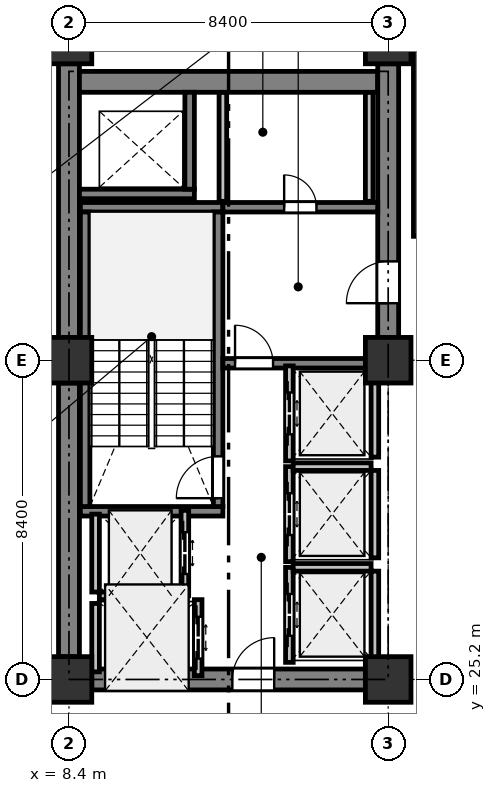
"""IFC4 building model, lengths in metres.
Left out: names, types, materials, properties, quantities, classifications, styles, units other than length and angle.
Written with IfcOpenShell. Run it as: python <this file> out.ifc"""

import sys

from ifc_helpers import new_model, si_unit, direction, frame, frame_2d, origin, origin_2d, place, context, subcontext, project, spatial, rectangle, extrude, element, fill, save


model = new_model("IFC4")
c1 = context("Model", 3, precision=1e-05, world=origin(), true_north=direction((0.0, 1.0)))
c2 = subcontext(c1, "Body", "Model", "MODEL_VIEW")
j1 = project(units=[si_unit("LENGTHUNIT", "METRE"), si_unit("PLANEANGLEUNIT", "RADIAN")], contexts=[c1])
p1 = place(None, origin())
s1 = spatial("IfcSite", under=j1, at=p1, CompositionType="ELEMENT")
p2 = place(p1, origin())
s2 = spatial("IfcBuilding", under=s1, at=p2, CompositionType="ELEMENT")
p3 = place(p2, frame((0.0, 0.0, 113.1)))
s3 = spatial("IfcBuildingStorey", under=s2, at=p3, CompositionType="ELEMENT", Elevation=113.1)
for number, where, z_axis, x_axis in (
    (1, (8.4, 25.2, 0.0), (0.0, 0.0, 1.0), (1.0, 0.0, 0.0)),
    (2, (8.4, 33.6, 0.0), (0.0, 0.0, 1.0), (1.0, 0.0, 0.0)),
    (3, (8.4, 42.0, 0.0), (0.0, 0.0, 1.0), (1.0, 0.0, 0.0)),
    (4, (16.8, 25.2, 0.0), (0.0, 0.0, 1.0), (1.0, 0.0, 0.0)),
    (5, (16.8, 33.6, 0.0), (0.0, 0.0, 1.0), (1.0, 0.0, 0.0)),
    (6, (16.8, 42.0, 0.0), (0.0, 0.0, 1.0), (1.0, 0.0, 0.0)),
):
    element("IfcColumn", number, at=place(p3, frame(where, z_axis=z_axis, x_axis=x_axis)), inside=s3, PredefinedType="COLUMN", context=c2, shape_type="SweptSolid", body=[
        extrude(rectangle(XDim=1.2, YDim=1.2, at=origin_2d()), origin(), (0.0, 0.0, 1.0), 4.1),
    ])
for number, where, z_axis, x_axis in (
    (7, (8.4, 25.8, 0.0), (0.0, 0.0, 1.0), (0.0, 1.0, 0.0)),
    (8, (8.4, 34.2, 0.0), (0.0, 0.0, 1.0), (0.0, 1.0, 0.0)),
):
    element("IfcWall", number, at=place(p3, frame(where, z_axis=z_axis, x_axis=x_axis)), inside=s3, PredefinedType="SHEAR", context=c2, shape_type="SweptSolid", body=[
        extrude(rectangle(XDim=7.2, YDim=0.55, at=frame_2d((3.6, 0.0))), origin(), (0.0, 0.0, 1.0), 3.825),
    ])
p4 = place(p3, frame((8.675, 40.925, 0.0), z_axis=(0.0, 0.0, 1.0), x_axis=(1.0, 0.0, 0.0)))
e9 = element("IfcWall", 9, at=p4, inside=s3, PredefinedType="SHEAR", context=c2, shape_type="SweptSolid", body=[
    extrude(rectangle(XDim=7.85, YDim=0.55, at=frame_2d((3.925, 0.0))), origin(), (0.0, 0.0, 1.0), 3.825),
])
p5 = place(p3, frame((16.8, 34.2, 0.0), z_axis=(0.0, 0.0, 1.0), x_axis=(0.0, 1.0, 0.0)))
e10 = element("IfcWall", 10, at=p5, inside=s3, PredefinedType="SHEAR", context=c2, shape_type="SweptSolid", body=[
    extrude(rectangle(XDim=7.2, YDim=0.55, at=frame_2d((3.6, 0.0))), origin(), (0.0, 0.0, 1.0), 3.825),
])
p6 = place(p5, frame((0.9, 0.0, 0.0)))
e11 = element("IfcOpeningElement", 11, at=p6, cuts=e10, PredefinedType="OPENING", context=c2, shape_type="SweptSolid", body=[
    extrude(rectangle(XDim=1.1, YDim=2.15, at=frame_2d((0.55, 1.075))), frame((0.0, 0.285, 0.0), z_axis=(0.0, -1.0, 0.0), x_axis=(1.0, 0.0, 0.0)), (0.0, 0.0, 1.0), 0.57),
])
p7 = place(p3, frame((9.0, 25.2, 0.0), z_axis=(0.0, 0.0, 1.0), x_axis=(1.0, 0.0, 0.0)))
e12 = element("IfcWall", 12, at=p7, inside=s3, PredefinedType="SHEAR", context=c2, shape_type="SweptSolid", body=[
    extrude(rectangle(XDim=7.2, YDim=0.55, at=frame_2d((3.6, 0.0))), origin(), (0.0, 0.0, 1.0), 3.825),
])
p8 = place(p7, frame((3.7, 0.0, 0.0)))
e13 = element("IfcOpeningElement", 13, at=p8, cuts=e12, PredefinedType="OPENING", context=c2, shape_type="SweptSolid", body=[
    extrude(rectangle(XDim=1.1, YDim=2.15, at=frame_2d((0.55, 1.075))), frame((0.0, 0.285, 0.0), z_axis=(0.0, -1.0, 0.0), x_axis=(1.0, 0.0, 0.0)), (0.0, 0.0, 1.0), 0.57),
])
for number, where, z_axis, x_axis in (
    (14, (12.45, 29.625, 0.0), (0.0, 0.0, 1.0), (-1.0, 0.0, 0.0)),
    (15, (12.45, 37.625, 0.0), (0.0, 0.0, 1.0), (-1.0, 0.0, 0.0)),
):
    element("IfcWall", number, at=place(p3, frame(where, z_axis=z_axis, x_axis=x_axis)), inside=s3, PredefinedType="SHEAR", context=c2, shape_type="SweptSolid", body=[
        extrude(rectangle(XDim=3.75, YDim=0.25, at=frame_2d((1.875, 0.0))), origin(), (0.0, 0.0, 1.0), 3.825),
    ])
p9 = place(p3, frame((12.325, 29.75, 0.0), z_axis=(0.0, 0.0, 1.0), x_axis=(0.0, 1.0, 0.0)))
e16 = element("IfcWall", 16, at=p9, inside=s3, PredefinedType="SHEAR", context=c2, shape_type="SweptSolid", body=[
    extrude(rectangle(XDim=7.75, YDim=0.25, at=frame_2d((3.875, 0.0))), origin(), (0.0, 0.0, 1.0), 3.825),
])
p10 = place(p9, frame((0.22, 0.0, 0.0)))
e17 = element("IfcOpeningElement", 17, at=p10, cuts=e16, PredefinedType="OPENING", context=c2, shape_type="SweptSolid", body=[
    extrude(rectangle(XDim=1.1, YDim=2.15, at=frame_2d((0.55, 1.075))), frame((0.0, 0.135, 0.0), z_axis=(0.0, -1.0, 0.0), x_axis=(1.0, 0.0, 0.0)), (0.0, 0.0, 1.0), 0.27),
])
p11 = place(p3, frame((8.825, 29.75, 0.0), z_axis=(0.0, 0.0, 1.0), x_axis=(0.0, 1.0, 0.0)))
e18 = element("IfcWall", 18, at=p11, inside=s3, PredefinedType="SHEAR", context=c2, shape_type="SweptSolid", body=[
    extrude(rectangle(XDim=7.75, YDim=0.25, at=frame_2d((3.875, 0.0))), origin(), (0.0, 0.0, 1.0), 3.825),
])
p12 = place(p3, frame((8.675, 37.975, 0.0), z_axis=(0.0, 0.0, 1.0), x_axis=(1.0, 0.0, 0.0)))
e19 = element("IfcWall", 19, at=p12, inside=s3, PredefinedType="SHEAR", context=c2, shape_type="SweptSolid", body=[
    extrude(rectangle(XDim=3.025, YDim=0.25, at=frame_2d((1.512, 0.0))), origin(), (0.0, 0.0, 1.0), 3.825),
])
p13 = place(p3, frame((11.575, 38.1, 0.0), z_axis=(0.0, 0.0, 1.0), x_axis=(0.0, 1.0, 0.0)))
e20 = element("IfcWall", 20, at=p13, inside=s3, PredefinedType="SHEAR", context=c2, shape_type="SweptSolid", body=[
    extrude(rectangle(XDim=2.55, YDim=0.25, at=frame_2d((1.275, 0.0))), origin(), (0.0, 0.0, 1.0), 3.825),
])
p14 = place(p3, frame((12.45, 33.52, 0.0), z_axis=(0.0, 0.0, 1.0), x_axis=(1.0, 0.0, 0.0)))
e21 = element("IfcWall", 21, at=p14, inside=s3, PredefinedType="SHEAR", context=c2, shape_type="SweptSolid", body=[
    extrude(rectangle(XDim=3.75, YDim=0.25, at=frame_2d((1.875, 0.0))), origin(), (0.0, 0.0, 1.0), 3.825),
])
p15 = place(p14, frame((0.32, 0.0, 0.0)))
e22 = element("IfcOpeningElement", 22, at=p15, cuts=e21, PredefinedType="OPENING", context=c2, shape_type="SweptSolid", body=[
    extrude(rectangle(XDim=1.0, YDim=2.15, at=frame_2d((0.5, 1.075))), frame((0.0, 0.135, 0.0), z_axis=(0.0, -1.0, 0.0), x_axis=(1.0, 0.0, 0.0)), (0.0, 0.0, 1.0), 0.27),
])
p16 = place(p3, frame((12.45, 37.625, 0.0), z_axis=(0.0, 0.0, 1.0), x_axis=(1.0, 0.0, 0.0)))
e23 = element("IfcWall", 23, at=p16, inside=s3, PredefinedType="SHEAR", context=c2, shape_type="SweptSolid", body=[
    extrude(rectangle(XDim=4.075, YDim=0.25, at=frame_2d((2.038, 0.0))), origin(), (0.0, 0.0, 1.0), 3.825),
])
p17 = place(p16, frame((1.613, 0.0, 0.0)))
e24 = element("IfcOpeningElement", 24, at=p17, cuts=e23, PredefinedType="OPENING", context=c2, shape_type="SweptSolid", body=[
    extrude(rectangle(XDim=0.85, YDim=2.15, at=frame_2d((0.425, 1.075))), frame((0.0, 0.135, 0.0), z_axis=(0.0, -1.0, 0.0), x_axis=(1.0, 0.0, 0.0)), (0.0, 0.0, 1.0), 0.27),
])
p18 = place(p3, frame((11.45, 27.4, 0.0), z_axis=(0.0, 0.0, 1.0), x_axis=(0.0, 1.0, 0.0)))
e25 = element("IfcWall", 25, at=p18, inside=s3, PredefinedType="PARTITIONING", context=c2, shape_type="SweptSolid", body=[
    extrude(rectangle(XDim=2.25, YDim=0.2, at=frame_2d((1.125, 0.0))), origin(), (0.0, 0.0, 1.0), 3.825),
])
p19 = place(p18, frame((0.575, 0.0, 0.0)))
e26 = element("IfcOpeningElement", 26, at=p19, cuts=e25, PredefinedType="OPENING", context=c2, shape_type="SweptSolid", body=[
    extrude(rectangle(XDim=1.1, YDim=2.2, at=frame_2d((0.55, 1.1))), frame((0.0, 0.11, 0.0), z_axis=(0.0, -1.0, 0.0), x_axis=(1.0, 0.0, 0.0)), (0.0, 0.0, 1.0), 0.22),
])
p20 = place(p3, frame((9.1, 27.5, 0.0), z_axis=(0.0, 0.0, 1.0), x_axis=(0.0, 1.0, 0.0)))
e27 = element("IfcWall", 27, at=p20, inside=s3, PredefinedType="PARTITIONING", context=c2, shape_type="SweptSolid", body=[
    extrude(rectangle(XDim=2.05, YDim=0.2, at=frame_2d((1.025, 0.0))), origin(), (0.0, 0.0, 1.0), 3.825),
])
p21 = place(p3, frame((9.2, 27.4, 0.0), z_axis=(0.0, 0.0, 1.0), x_axis=(1.0, 0.0, 0.0)))
e28 = element("IfcWall", 28, at=p21, inside=s3, PredefinedType="PARTITIONING", context=c2, shape_type="SweptSolid", body=[
    extrude(rectangle(XDim=2.15, YDim=0.2, at=frame_2d((1.075, 0.0))), origin(), (0.0, 0.0, 1.0), 3.825),
])
p22 = place(p3, frame((11.8, 25.3, 0.0), z_axis=(0.0, 0.0, 1.0), x_axis=(0.0, 1.0, 0.0)))
e29 = element("IfcWall", 29, at=p22, inside=s3, PredefinedType="PARTITIONING", context=c2, shape_type="SweptSolid", body=[
    extrude(rectangle(XDim=2.0, YDim=0.2, at=frame_2d((1.0, 0.0))), origin(), (0.0, 0.0, 1.0), 3.825),
])
p23 = place(p22, frame((0.45, 0.0, 0.0)))
e30 = element("IfcOpeningElement", 30, at=p23, cuts=e29, PredefinedType="OPENING", context=c2, shape_type="SweptSolid", body=[
    extrude(rectangle(XDim=1.1, YDim=2.2, at=frame_2d((0.55, 1.1))), frame((0.0, 0.11, 0.0), z_axis=(0.0, -1.0, 0.0), x_axis=(1.0, 0.0, 0.0)), (0.0, 0.0, 1.0), 0.22),
])
p24 = place(p3, frame((9.1, 25.4, 0.0), z_axis=(0.0, 0.0, 1.0), x_axis=(0.0, 1.0, 0.0)))
e31 = element("IfcWall", 31, at=p24, inside=s3, PredefinedType="PARTITIONING", context=c2, shape_type="SweptSolid", body=[
    extrude(rectangle(XDim=1.8, YDim=0.2, at=frame_2d((0.9, 0.0))), origin(), (0.0, 0.0, 1.0), 3.825),
])
p25 = place(p3, frame((14.2, 25.65, 0.0), z_axis=(0.0, 0.0, 1.0), x_axis=(0.0, 1.0, 0.0)))
e32 = element("IfcWall", 32, at=p25, inside=s3, PredefinedType="PARTITIONING", context=c2, shape_type="SweptSolid", body=[
    extrude(rectangle(XDim=2.5, YDim=0.2, at=frame_2d((1.25, 0.0))), origin(), (0.0, 0.0, 1.0), 3.825),
])
p26 = place(p25, frame((0.7, 0.0, 0.0)))
e33 = element("IfcOpeningElement", 33, at=p26, cuts=e32, PredefinedType="OPENING", context=c2, shape_type="SweptSolid", body=[
    extrude(rectangle(XDim=1.1, YDim=2.2, at=frame_2d((0.55, 1.1))), frame((0.0, 0.11, 0.0), z_axis=(0.0, -1.0, 0.0), x_axis=(1.0, 0.0, 0.0)), (0.0, 0.0, 1.0), 0.22),
])
p27 = place(p3, frame((16.45, 25.75, 0.0), z_axis=(0.0, 0.0, 1.0), x_axis=(0.0, 1.0, 0.0)))
e34 = element("IfcWall", 34, at=p27, inside=s3, PredefinedType="PARTITIONING", context=c2, shape_type="SweptSolid", body=[
    extrude(rectangle(XDim=2.3, YDim=0.2, at=frame_2d((1.15, 0.0))), origin(), (0.0, 0.0, 1.0), 3.825),
])
p28 = place(p3, frame((14.3, 28.15, 0.0), z_axis=(0.0, 0.0, 1.0), x_axis=(1.0, 0.0, 0.0)))
e35 = element("IfcWall", 35, at=p28, inside=s3, PredefinedType="PARTITIONING", context=c2, shape_type="SweptSolid", body=[
    extrude(rectangle(XDim=2.05, YDim=0.2, at=frame_2d((1.025, 0.0))), origin(), (0.0, 0.0, 1.0), 3.825),
])
p29 = place(p3, frame((14.2, 28.3, 0.0), z_axis=(0.0, 0.0, 1.0), x_axis=(0.0, 1.0, 0.0)))
e36 = element("IfcWall", 36, at=p29, inside=s3, PredefinedType="PARTITIONING", context=c2, shape_type="SweptSolid", body=[
    extrude(rectangle(XDim=2.5, YDim=0.2, at=frame_2d((1.25, 0.0))), origin(), (0.0, 0.0, 1.0), 3.825),
])
p30 = place(p29, frame((0.7, 0.0, 0.0)))
e37 = element("IfcOpeningElement", 37, at=p30, cuts=e36, PredefinedType="OPENING", context=c2, shape_type="SweptSolid", body=[
    extrude(rectangle(XDim=1.1, YDim=2.2, at=frame_2d((0.55, 1.1))), frame((0.0, 0.11, 0.0), z_axis=(0.0, -1.0, 0.0), x_axis=(1.0, 0.0, 0.0)), (0.0, 0.0, 1.0), 0.22),
])
p31 = place(p3, frame((16.45, 28.4, 0.0), z_axis=(0.0, 0.0, 1.0), x_axis=(0.0, 1.0, 0.0)))
e38 = element("IfcWall", 38, at=p31, inside=s3, PredefinedType="PARTITIONING", context=c2, shape_type="SweptSolid", body=[
    extrude(rectangle(XDim=2.3, YDim=0.2, at=frame_2d((1.15, 0.0))), origin(), (0.0, 0.0, 1.0), 3.825),
])
p32 = place(p3, frame((14.3, 30.8, 0.0), z_axis=(0.0, 0.0, 1.0), x_axis=(1.0, 0.0, 0.0)))
e39 = element("IfcWall", 39, at=p32, inside=s3, PredefinedType="PARTITIONING", context=c2, shape_type="SweptSolid", body=[
    extrude(rectangle(XDim=2.05, YDim=0.2, at=frame_2d((1.025, 0.0))), origin(), (0.0, 0.0, 1.0), 3.825),
])
p33 = place(p3, frame((14.2, 30.95, 0.0), z_axis=(0.0, 0.0, 1.0), x_axis=(0.0, 1.0, 0.0)))
e40 = element("IfcWall", 40, at=p33, inside=s3, PredefinedType="PARTITIONING", context=c2, shape_type="SweptSolid", body=[
    extrude(rectangle(XDim=2.5, YDim=0.2, at=frame_2d((1.25, 0.0))), origin(), (0.0, 0.0, 1.0), 3.825),
])
p34 = place(p33, frame((0.7, 0.0, 0.0)))
e41 = element("IfcOpeningElement", 41, at=p34, cuts=e40, PredefinedType="OPENING", context=c2, shape_type="SweptSolid", body=[
    extrude(rectangle(XDim=1.1, YDim=2.2, at=frame_2d((0.55, 1.1))), frame((0.0, 0.11, 0.0), z_axis=(0.0, -1.0, 0.0), x_axis=(1.0, 0.0, 0.0)), (0.0, 0.0, 1.0), 0.22),
])
p35 = place(p3, frame((16.45, 31.05, 0.0), z_axis=(0.0, 0.0, 1.0), x_axis=(0.0, 1.0, 0.0)))
e42 = element("IfcWall", 42, at=p35, inside=s3, PredefinedType="PARTITIONING", context=c2, shape_type="SweptSolid", body=[
    extrude(rectangle(XDim=2.3, YDim=0.2, at=frame_2d((1.15, 0.0))), origin(), (0.0, 0.0, 1.0), 3.825),
])
for number, where, z_axis, x_axis in (
    (43, (16.3, 37.78, 0.0), (0.0, 0.0, 1.0), (0.0, 1.0, 0.0)),
    (44, (12.45, 40.646, 0.0), (0.0, 0.0, 1.0), (0.0, -1.0, 0.0)),
):
    element("IfcWall", number, at=place(p3, frame(where, z_axis=z_axis, x_axis=x_axis)), inside=s3, PredefinedType="PARTITIONING", context=c2, shape_type="SweptSolid", body=[
        extrude(rectangle(XDim=2.866, YDim=0.2, at=frame_2d((1.433, 0.0))), origin(), (0.0, 0.0, 1.0), 2.725),
    ])
p36 = place(p3, frame((17.54, 36.86, 0.0), z_axis=(0.0, 0.0, 1.0), x_axis=(0.0, 1.0, 0.0)))
e45 = element("IfcWall", 45, at=p36, inside=s3, PredefinedType="PARTITIONING", context=c2, shape_type="SweptSolid", body=[
    extrude(rectangle(XDim=8.34, YDim=0.15, at=frame_2d((4.17, 0.0))), origin(), (0.0, 0.0, 1.0), 3.292),
])
p37 = place(p36, frame((6.364, 0.0, 0.0)))
e46 = element("IfcOpeningElement", 46, at=p37, cuts=e45, PredefinedType="OPENING", context=c2, shape_type="SweptSolid", body=[
    extrude(rectangle(XDim=0.95, YDim=2.15, at=frame_2d((0.475, 1.075))), frame((0.0, 0.085, 0.0), z_axis=(0.0, -1.0, 0.0), x_axis=(1.0, 0.0, 0.0)), (0.0, 0.0, 1.0), 0.17),
])
p38 = place(p6, origin())
e47 = element("IfcDoor", 47, at=p38, inside=s3, OperationType="SINGLE_SWING_LEFT", PredefinedType="DOOR", context=c2, shape_type="SweptSolid", body=[
    extrude(rectangle(XDim=1.1, YDim=2.15, at=frame_2d((0.55, 1.075))), frame((0.0, 0.025, 0.0), z_axis=(0.0, -1.0, 0.0), x_axis=(1.0, 0.0, 0.0)), (0.0, 0.0, 1.0), 0.05),
])
fill(e11, e47)
p39 = place(p8, origin())
e48 = element("IfcDoor", 48, at=p39, inside=s3, OperationType="SINGLE_SWING_RIGHT", PredefinedType="DOOR", context=c2, shape_type="SweptSolid", body=[
    extrude(rectangle(XDim=1.1, YDim=2.15, at=frame_2d((0.55, 1.075))), frame((0.0, 0.025, 0.0), z_axis=(0.0, -1.0, 0.0), x_axis=(1.0, 0.0, 0.0)), (0.0, 0.0, 1.0), 0.05),
])
fill(e13, e48)
p40 = place(p10, origin())
e49 = element("IfcDoor", 49, at=p40, inside=s3, OperationType="SINGLE_SWING_LEFT", PredefinedType="DOOR", context=c2, shape_type="SweptSolid", body=[
    extrude(rectangle(XDim=1.1, YDim=2.15, at=frame_2d((0.55, 1.075))), frame((0.0, 0.025, 0.0), z_axis=(0.0, -1.0, 0.0), x_axis=(1.0, 0.0, 0.0)), (0.0, 0.0, 1.0), 0.05),
])
fill(e17, e49)
p41 = place(p15, origin())
e50 = element("IfcDoor", 50, at=p41, inside=s3, OperationType="SINGLE_SWING_LEFT", PredefinedType="DOOR", context=c2, shape_type="SweptSolid", body=[
    extrude(rectangle(XDim=1.0, YDim=2.15, at=frame_2d((0.5, 1.075))), frame((0.0, 0.025, 0.0), z_axis=(0.0, -1.0, 0.0), x_axis=(1.0, 0.0, 0.0)), (0.0, 0.0, 1.0), 0.05),
])
fill(e22, e50)
p42 = place(p19, origin())
e51 = element("IfcDoor", 51, at=p42, inside=s3, OperationType="DOUBLE_DOOR_SLIDING", PredefinedType="DOOR", context=c2, shape_type="SweptSolid", body=[
    extrude(rectangle(XDim=1.1, YDim=2.2, at=frame_2d((0.55, 1.1))), frame((0.0, 0.025, 0.0), z_axis=(0.0, -1.0, 0.0), x_axis=(1.0, 0.0, 0.0)), (0.0, 0.0, 1.0), 0.05),
])
fill(e26, e51)
p43 = place(p23, origin())
e52 = element("IfcDoor", 52, at=p43, inside=s3, OperationType="DOUBLE_DOOR_SLIDING", PredefinedType="DOOR", context=c2, shape_type="SweptSolid", body=[
    extrude(rectangle(XDim=1.1, YDim=2.2, at=frame_2d((0.55, 1.1))), frame((0.0, 0.025, 0.0), z_axis=(0.0, -1.0, 0.0), x_axis=(1.0, 0.0, 0.0)), (0.0, 0.0, 1.0), 0.05),
])
fill(e30, e52)
p44 = place(p26, origin())
e53 = element("IfcDoor", 53, at=p44, inside=s3, OperationType="DOUBLE_DOOR_SLIDING", PredefinedType="DOOR", context=c2, shape_type="SweptSolid", body=[
    extrude(rectangle(XDim=1.1, YDim=2.2, at=frame_2d((0.55, 1.1))), frame((0.0, 0.025, 0.0), z_axis=(0.0, -1.0, 0.0), x_axis=(1.0, 0.0, 0.0)), (0.0, 0.0, 1.0), 0.05),
])
fill(e33, e53)
p45 = place(p30, origin())
e54 = element("IfcDoor", 54, at=p45, inside=s3, OperationType="DOUBLE_DOOR_SLIDING", PredefinedType="DOOR", context=c2, shape_type="SweptSolid", body=[
    extrude(rectangle(XDim=1.1, YDim=2.2, at=frame_2d((0.55, 1.1))), frame((0.0, 0.025, 0.0), z_axis=(0.0, -1.0, 0.0), x_axis=(1.0, 0.0, 0.0)), (0.0, 0.0, 1.0), 0.05),
])
fill(e37, e54)
p46 = place(p34, origin())
e55 = element("IfcDoor", 55, at=p46, inside=s3, OperationType="DOUBLE_DOOR_SLIDING", PredefinedType="DOOR", context=c2, shape_type="SweptSolid", body=[
    extrude(rectangle(XDim=1.1, YDim=2.2, at=frame_2d((0.55, 1.1))), frame((0.0, 0.025, 0.0), z_axis=(0.0, -1.0, 0.0), x_axis=(1.0, 0.0, 0.0)), (0.0, 0.0, 1.0), 0.05),
])
fill(e41, e55)
p47 = place(p17, origin())
e56 = element("IfcDoor", 56, at=p47, inside=s3, OperationType="SINGLE_SWING_LEFT", PredefinedType="DOOR", context=c2, shape_type="SweptSolid", body=[
    extrude(rectangle(XDim=0.85, YDim=2.15, at=frame_2d((0.425, 1.075))), frame((0.0, 0.025, 0.0), z_axis=(0.0, -1.0, 0.0), x_axis=(1.0, 0.0, 0.0)), (0.0, 0.0, 1.0), 0.05),
])
fill(e24, e56)
save(model, sys.argv[1])
